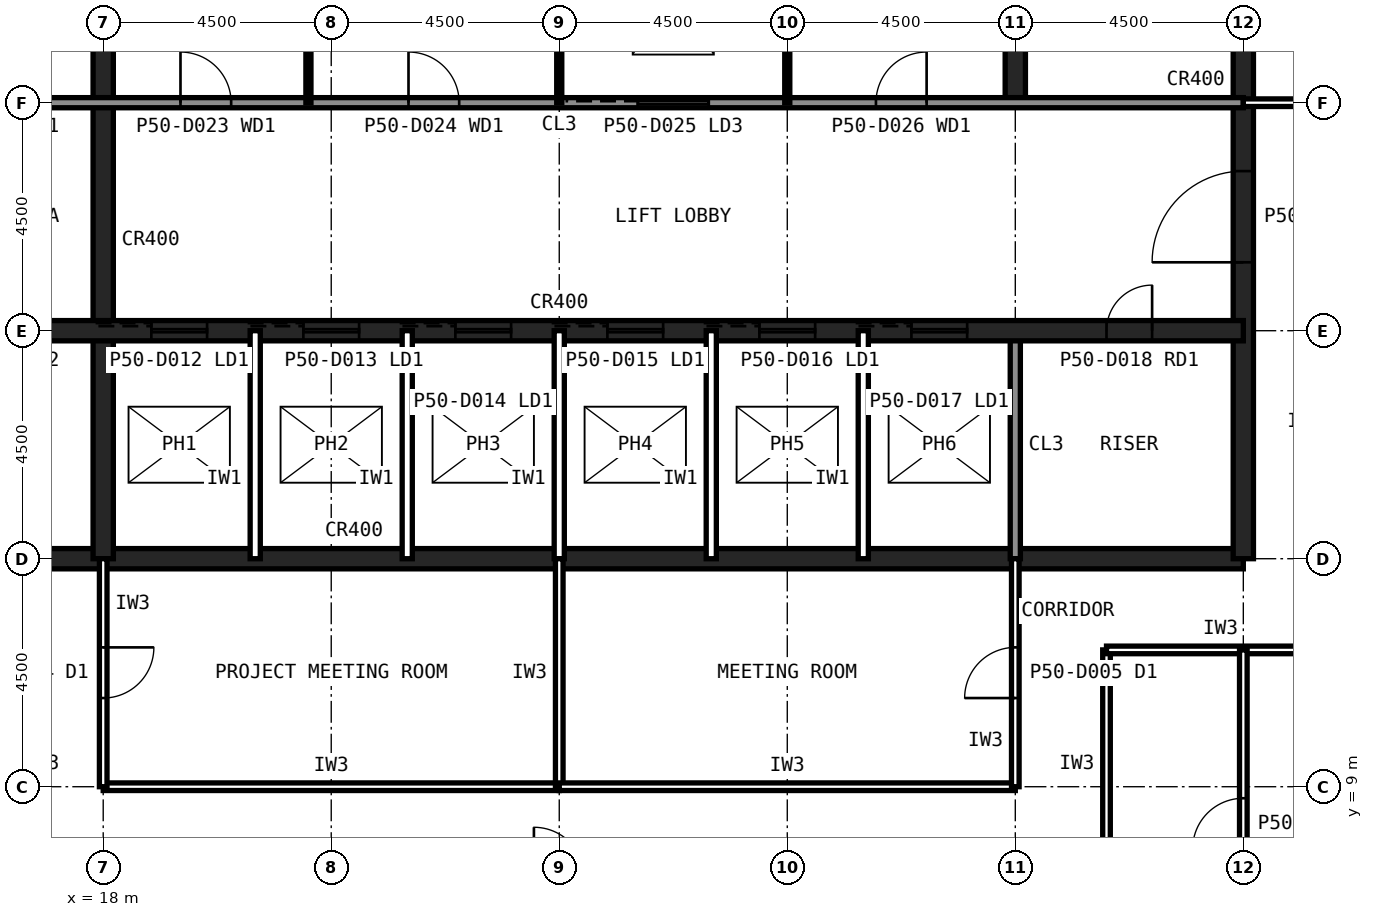
"""IFC4 building model, lengths in metres.
Left out: names, types, materials, properties, quantities, classifications, styles, units other than length and angle.
Written with IfcOpenShell. Run it as: python <this file> out.ifc"""

import sys

from ifc_helpers import new_model, si_unit, direction, frame, frame_2d, origin, place, context, subcontext, project, spatial, rectangle, extrude, element, fill, save


model = new_model("IFC4")
c1 = context("Model", 3, precision=1e-05, world=origin(), true_north=direction((0.0, 1.0)))
c2 = subcontext(c1, "Body", "Model", "MODEL_VIEW")
j1 = project(units=[si_unit("LENGTHUNIT", "METRE"), si_unit("PLANEANGLEUNIT", "RADIAN")], contexts=[c1])
p1 = place(None, origin())
s1 = spatial("IfcSite", under=j1, at=p1, CompositionType="ELEMENT")
p2 = place(p1, origin())
s2 = spatial("IfcBuilding", under=s1, at=p2, CompositionType="ELEMENT")
p3 = place(p2, frame((0.0, 0.0, 214.6)))
s3 = spatial("IfcBuildingStorey", under=s2, at=p3, CompositionType="ELEMENT", Elevation=214.6)
p4 = place(p3, frame((13.5, 13.5, 0.0), z_axis=(0.0, 0.0, 1.0), x_axis=(1.0, 0.0, 0.0)))
e1 = element("IfcWall", 1, at=p4, inside=s3, PredefinedType="SHEAR", context=c2, shape_type="SweptSolid", body=[
    extrude(rectangle(XDim=27.0, YDim=0.4, at=frame_2d((13.5, 0.0))), origin(), (0.0, 0.0, 1.0), 4.0),
])
p5 = place(p3, frame((40.5, 13.5, 0.0), z_axis=(0.0, 0.0, 1.0), x_axis=(0.0, 1.0, 0.0)))
e2 = element("IfcWall", 2, at=p5, inside=s3, PredefinedType="SHEAR", context=c2, shape_type="SweptSolid", body=[
    extrude(rectangle(XDim=27.0, YDim=0.4, at=frame_2d((13.5, 0.0))), origin(), (0.0, 0.0, 1.0), 4.0),
])
p6 = place(p5, frame((5.85, 0.0, 0.0)))
e3 = element("IfcOpeningElement", 3, at=p6, cuts=e2, PredefinedType="OPENING", context=c2, shape_type="SweptSolid", body=[
    extrude(rectangle(XDim=1.8, YDim=2.1, at=frame_2d((0.9, 1.05))), frame((0.0, 0.21, 0.0), z_axis=(0.0, -1.0, 0.0), x_axis=(1.0, 0.0, 0.0)), (0.0, 0.0, 1.0), 0.42),
])
p7 = place(p5, frame((19.65, 0.0, 0.0)))
e4 = element("IfcOpeningElement", 4, at=p7, cuts=e2, PredefinedType="OPENING", context=c2, shape_type="SweptSolid", body=[
    extrude(rectangle(XDim=1.2, YDim=2.1, at=frame_2d((0.6, 1.05))), frame((0.0, 0.21, 0.0), z_axis=(0.0, -1.0, 0.0), x_axis=(1.0, 0.0, 0.0)), (0.0, 0.0, 1.0), 0.42),
])
p8 = place(p3, frame((18.0, 13.5, 0.0), z_axis=(0.0, 0.0, 1.0), x_axis=(0.0, 1.0, 0.0)))
e5 = element("IfcWall", 5, at=p8, inside=s3, PredefinedType="SHEAR", context=c2, shape_type="SweptSolid", body=[
    extrude(rectangle(XDim=18.0, YDim=0.4, at=frame_2d((9.0, 0.0))), origin(), (0.0, 0.0, 1.0), 4.0),
])
p9 = place(p3, frame((36.0, 13.5, 0.0), z_axis=(0.0, 0.0, 1.0), x_axis=(0.0, 1.0, 0.0)))
e6 = element("IfcWall", 6, at=p9, inside=s3, PredefinedType="SOLIDWALL", context=c2, shape_type="SweptSolid", body=[
    extrude(rectangle(XDim=4.5, YDim=0.2, at=frame_2d((2.25, 0.0))), origin(), (0.0, 0.0, 1.0), 3.84),
])
p10 = place(p3, frame((36.0, 22.5, 0.0), z_axis=(0.0, 0.0, 1.0), x_axis=(0.0, 1.0, 0.0)))
e7 = element("IfcWall", 7, at=p10, inside=s3, PredefinedType="SHEAR", context=c2, shape_type="SweptSolid", body=[
    extrude(rectangle(XDim=18.0, YDim=0.4, at=frame_2d((9.0, 0.0))), origin(), (0.0, 0.0, 1.0), 4.0),
])
p11 = place(p3, frame((13.5, 18.0, 0.0), z_axis=(0.0, 0.0, 1.0), x_axis=(1.0, 0.0, 0.0)))
e8 = element("IfcWall", 8, at=p11, inside=s3, PredefinedType="SHEAR", context=c2, shape_type="SweptSolid", body=[
    extrude(rectangle(XDim=27.0, YDim=0.4, at=frame_2d((13.5, 0.0))), origin(), (0.0, 0.0, 1.0), 4.0),
])
p12 = place(p11, frame((24.3, 0.0, 0.0)))
e9 = element("IfcOpeningElement", 9, at=p12, cuts=e8, PredefinedType="OPENING", context=c2, shape_type="SweptSolid", body=[
    extrude(rectangle(XDim=0.9, YDim=2.1, at=frame_2d((0.45, 1.05))), frame((0.0, 0.21, 0.0), z_axis=(0.0, -1.0, 0.0), x_axis=(1.0, 0.0, 0.0)), (0.0, 0.0, 1.0), 0.42),
])
p13 = place(p11, frame((5.45, 0.0, 0.0)))
e10 = element("IfcOpeningElement", 10, at=p13, cuts=e8, PredefinedType="OPENING", context=c2, shape_type="SweptSolid", body=[
    extrude(rectangle(XDim=1.1, YDim=2.1, at=frame_2d((0.55, 1.05))), frame((0.0, 0.21, 0.0), z_axis=(0.0, -1.0, 0.0), x_axis=(1.0, 0.0, 0.0)), (0.0, 0.0, 1.0), 0.42),
])
p14 = place(p11, frame((8.45, 0.0, 0.0)))
e11 = element("IfcOpeningElement", 11, at=p14, cuts=e8, PredefinedType="OPENING", context=c2, shape_type="SweptSolid", body=[
    extrude(rectangle(XDim=1.1, YDim=2.1, at=frame_2d((0.55, 1.05))), frame((0.0, 0.21, 0.0), z_axis=(0.0, -1.0, 0.0), x_axis=(1.0, 0.0, 0.0)), (0.0, 0.0, 1.0), 0.42),
])
p15 = place(p11, frame((11.45, 0.0, 0.0)))
e12 = element("IfcOpeningElement", 12, at=p15, cuts=e8, PredefinedType="OPENING", context=c2, shape_type="SweptSolid", body=[
    extrude(rectangle(XDim=1.1, YDim=2.1, at=frame_2d((0.55, 1.05))), frame((0.0, 0.21, 0.0), z_axis=(0.0, -1.0, 0.0), x_axis=(1.0, 0.0, 0.0)), (0.0, 0.0, 1.0), 0.42),
])
p16 = place(p11, frame((14.45, 0.0, 0.0)))
e13 = element("IfcOpeningElement", 13, at=p16, cuts=e8, PredefinedType="OPENING", context=c2, shape_type="SweptSolid", body=[
    extrude(rectangle(XDim=1.1, YDim=2.1, at=frame_2d((0.55, 1.05))), frame((0.0, 0.21, 0.0), z_axis=(0.0, -1.0, 0.0), x_axis=(1.0, 0.0, 0.0)), (0.0, 0.0, 1.0), 0.42),
])
p17 = place(p11, frame((17.45, 0.0, 0.0)))
e14 = element("IfcOpeningElement", 14, at=p17, cuts=e8, PredefinedType="OPENING", context=c2, shape_type="SweptSolid", body=[
    extrude(rectangle(XDim=1.1, YDim=2.1, at=frame_2d((0.55, 1.05))), frame((0.0, 0.21, 0.0), z_axis=(0.0, -1.0, 0.0), x_axis=(1.0, 0.0, 0.0)), (0.0, 0.0, 1.0), 0.42),
])
p18 = place(p11, frame((20.45, 0.0, 0.0)))
e15 = element("IfcOpeningElement", 15, at=p18, cuts=e8, PredefinedType="OPENING", context=c2, shape_type="SweptSolid", body=[
    extrude(rectangle(XDim=1.1, YDim=2.1, at=frame_2d((0.55, 1.05))), frame((0.0, 0.21, 0.0), z_axis=(0.0, -1.0, 0.0), x_axis=(1.0, 0.0, 0.0)), (0.0, 0.0, 1.0), 0.42),
])
p19 = place(p11, frame((1.6, 0.0, 0.0)))
e16 = element("IfcOpeningElement", 16, at=p19, cuts=e8, PredefinedType="OPENING", context=c2, shape_type="SweptSolid", body=[
    extrude(rectangle(XDim=1.3, YDim=2.2, at=frame_2d((0.65, 1.1))), frame((0.0, 0.21, 0.0), z_axis=(0.0, -1.0, 0.0), x_axis=(1.0, 0.0, 0.0)), (0.0, 0.0, 1.0), 0.42),
])
p20 = place(p3, frame((13.5, 22.5, 0.0), z_axis=(0.0, 0.0, 1.0), x_axis=(1.0, 0.0, 0.0)))
e17 = element("IfcWall", 17, at=p20, inside=s3, PredefinedType="SOLIDWALL", context=c2, shape_type="SweptSolid", body=[
    extrude(rectangle(XDim=27.0, YDim=0.2, at=frame_2d((13.5, 0.0))), origin(), (0.0, 0.0, 1.0), 3.84),
])
p21 = place(p20, frame((1.65, 0.0, 0.0)))
e18 = element("IfcOpeningElement", 18, at=p21, cuts=e17, PredefinedType="OPENING", context=c2, shape_type="SweptSolid", body=[
    extrude(rectangle(XDim=1.2, YDim=2.1, at=frame_2d((0.6, 1.05))), frame((0.0, 0.11, 0.0), z_axis=(0.0, -1.0, 0.0), x_axis=(1.0, 0.0, 0.0)), (0.0, 0.0, 1.0), 0.22),
])
p22 = place(p20, frame((6.025, 0.0, 0.0)))
e19 = element("IfcOpeningElement", 19, at=p22, cuts=e17, PredefinedType="OPENING", context=c2, shape_type="SweptSolid", body=[
    extrude(rectangle(XDim=1.0, YDim=2.1, at=frame_2d((0.5, 1.05))), frame((0.0, 0.11, 0.0), z_axis=(0.0, -1.0, 0.0), x_axis=(1.0, 0.0, 0.0)), (0.0, 0.0, 1.0), 0.22),
])
p23 = place(p20, frame((10.525, 0.0, 0.0)))
e20 = element("IfcOpeningElement", 20, at=p23, cuts=e17, PredefinedType="OPENING", context=c2, shape_type="SweptSolid", body=[
    extrude(rectangle(XDim=1.0, YDim=2.1, at=frame_2d((0.5, 1.05))), frame((0.0, 0.11, 0.0), z_axis=(0.0, -1.0, 0.0), x_axis=(1.0, 0.0, 0.0)), (0.0, 0.0, 1.0), 0.22),
])
p24 = place(p20, frame((19.75, 0.0, 0.0)))
e21 = element("IfcOpeningElement", 21, at=p24, cuts=e17, PredefinedType="OPENING", context=c2, shape_type="SweptSolid", body=[
    extrude(rectangle(XDim=1.0, YDim=2.1, at=frame_2d((0.5, 1.05))), frame((0.0, 0.11, 0.0), z_axis=(0.0, -1.0, 0.0), x_axis=(1.0, 0.0, 0.0)), (0.0, 0.0, 1.0), 0.22),
])
p25 = place(p20, frame((15.05, 0.0, 0.0)))
e22 = element("IfcOpeningElement", 22, at=p25, cuts=e17, PredefinedType="OPENING", context=c2, shape_type="SweptSolid", body=[
    extrude(rectangle(XDim=1.4, YDim=2.4, at=frame_2d((0.7, 1.2))), frame((0.0, 0.11, 0.0), z_axis=(0.0, -1.0, 0.0), x_axis=(1.0, 0.0, 0.0)), (0.0, 0.0, 1.0), 0.22),
])
for number, where, z_axis, x_axis in (
    (23, (21.0, 13.5, 0.0), (0.0, 0.0, 1.0), (0.0, 1.0, 0.0)),
    (24, (24.0, 13.5, 0.0), (0.0, 0.0, 1.0), (0.0, 1.0, 0.0)),
    (25, (27.0, 13.5, 0.0), (0.0, 0.0, 1.0), (0.0, 1.0, 0.0)),
    (26, (30.0, 13.5, 0.0), (0.0, 0.0, 1.0), (0.0, 1.0, 0.0)),
    (27, (33.0, 13.5, 0.0), (0.0, 0.0, 1.0), (0.0, 1.0, 0.0)),
):
    element("IfcWall", number, at=place(p3, frame(where, z_axis=z_axis, x_axis=x_axis)), inside=s3, PredefinedType="PARTITIONING", context=c2, shape_type="SweptSolid", body=[
        extrude(rectangle(XDim=4.5, YDim=0.2, at=frame_2d((2.25, 0.0))), origin(), (0.0, 0.0, 1.0), 3.84),
    ])
for number, where, z_axis, x_axis in (
    (28, (22.05, 22.5, 0.0), (0.0, 0.0, 1.0), (0.0, 1.0, 0.0)),
    (29, (27.0, 22.5, 0.0), (0.0, 0.0, 1.0), (0.0, 1.0, 0.0)),
    (30, (31.5, 22.5, 0.0), (0.0, 0.0, 1.0), (0.0, 1.0, 0.0)),
):
    element("IfcWall", number, at=place(p3, frame(where, z_axis=z_axis, x_axis=x_axis)), inside=s3, PredefinedType="PLUMBINGWALL", context=c2, shape_type="SweptSolid", body=[
        extrude(rectangle(XDim=9.0, YDim=0.1, at=frame_2d((4.5, 0.0))), origin(), (0.0, 0.0, 1.0), 3.84),
    ])
for number, where, z_axis, x_axis in (
    (31, (37.8, 7.2, 0.0), (0.0, 0.0, 1.0), (0.0, 1.0, 0.0)),
    (32, (37.8, 11.7, 0.0), (0.0, 0.0, 1.0), (1.0, 0.0, 0.0)),
):
    element("IfcWall", number, at=place(p3, frame(where, z_axis=z_axis, x_axis=x_axis)), inside=s3, PredefinedType="PARTITIONING", context=c2, shape_type="SweptSolid", body=[
        extrude(rectangle(XDim=4.5, YDim=0.15, at=frame_2d((2.25, 0.0))), origin(), (0.0, 0.0, 1.0), 3.84),
    ])
p26 = place(p3, frame((18.0, 9.0, 0.0), z_axis=(0.0, 0.0, 1.0), x_axis=(1.0, 0.0, 0.0)))
e33 = element("IfcWall", 33, at=p26, inside=s3, PredefinedType="PARTITIONING", context=c2, shape_type="SweptSolid", body=[
    extrude(rectangle(XDim=9.0, YDim=0.15, at=frame_2d((4.5, 0.0))), origin(), (0.0, 0.0, 1.0), 3.84),
])
p27 = place(p3, frame((27.0, 9.0, 0.0), z_axis=(0.0, 0.0, 1.0), x_axis=(0.0, 1.0, 0.0)))
e34 = element("IfcWall", 34, at=p27, inside=s3, PredefinedType="PARTITIONING", context=c2, shape_type="SweptSolid", body=[
    extrude(rectangle(XDim=4.5, YDim=0.15, at=frame_2d((2.25, 0.0))), origin(), (0.0, 0.0, 1.0), 2.989),
])
p28 = place(p3, frame((18.0, 13.5, 0.0), z_axis=(0.0, 0.0, 1.0), x_axis=(0.0, -1.0, 0.0)))
e35 = element("IfcWall", 35, at=p28, inside=s3, PredefinedType="PARTITIONING", context=c2, shape_type="SweptSolid", body=[
    extrude(rectangle(XDim=4.5, YDim=0.15, at=frame_2d((2.25, 0.0))), origin(), (0.0, 0.0, 1.0), 2.989),
])
p29 = place(p28, frame((1.75, 0.0, 0.0)))
e36 = element("IfcOpeningElement", 36, at=p29, cuts=e35, PredefinedType="OPENING", context=c2, shape_type="SweptSolid", body=[
    extrude(rectangle(XDim=1.0, YDim=2.1, at=frame_2d((0.5, 1.05))), frame((0.0, 0.085, 0.0), z_axis=(0.0, -1.0, 0.0), x_axis=(1.0, 0.0, 0.0)), (0.0, 0.0, 1.0), 0.17),
])
p30 = place(p3, frame((40.5, 22.5, 0.0), z_axis=(0.0, 0.0, 1.0), x_axis=(1.0, 0.0, 0.0)))
e37 = element("IfcWall", 37, at=p30, inside=s3, PredefinedType="PARTITIONING", context=c2, shape_type="SweptSolid", body=[
    extrude(rectangle(XDim=4.5, YDim=0.15, at=frame_2d((2.25, 0.0))), origin(), (0.0, 0.0, 1.0), 2.989),
])
p31 = place(p3, frame((27.0, 9.0, 0.0), z_axis=(0.0, 0.0, 1.0), x_axis=(1.0, 0.0, 0.0)))
e38 = element("IfcWall", 38, at=p31, inside=s3, PredefinedType="PARTITIONING", context=c2, shape_type="SweptSolid", body=[
    extrude(rectangle(XDim=9.0, YDim=0.15, at=frame_2d((4.5, 0.0))), origin(), (0.0, 0.0, 1.0), 3.84),
])
p32 = place(p3, frame((36.0, 9.0, 0.0), z_axis=(0.0, 0.0, 1.0), x_axis=(0.0, 1.0, 0.0)))
e39 = element("IfcWall", 39, at=p32, inside=s3, PredefinedType="PARTITIONING", context=c2, shape_type="SweptSolid", body=[
    extrude(rectangle(XDim=4.5, YDim=0.15, at=frame_2d((2.25, 0.0))), origin(), (0.0, 0.0, 1.0), 2.989),
])
p33 = place(p32, frame((1.75, 0.0, 0.0)))
e40 = element("IfcOpeningElement", 40, at=p33, cuts=e39, PredefinedType="OPENING", context=c2, shape_type="SweptSolid", body=[
    extrude(rectangle(XDim=1.0, YDim=2.1, at=frame_2d((0.5, 1.05))), frame((0.0, 0.085, 0.0), z_axis=(0.0, -1.0, 0.0), x_axis=(1.0, 0.0, 0.0)), (0.0, 0.0, 1.0), 0.17),
])
p34 = place(p3, frame((40.5, 4.845, 0.0), z_axis=(0.0, 0.0, 1.0), x_axis=(0.0, 1.0, 0.0)))
e41 = element("IfcWall", 41, at=p34, inside=s3, PredefinedType="PARTITIONING", context=c2, shape_type="SweptSolid", body=[
    extrude(rectangle(XDim=6.855, YDim=0.15, at=frame_2d((3.427, 0.0))), origin(), (0.0, 0.0, 1.0), 2.989),
])
p35 = place(p34, frame((2.927, 0.0, 0.0)))
e42 = element("IfcOpeningElement", 42, at=p35, cuts=e41, PredefinedType="OPENING", context=c2, shape_type="SweptSolid", body=[
    extrude(rectangle(XDim=1.0, YDim=2.1, at=frame_2d((0.5, 1.05))), frame((0.0, 0.085, 0.0), z_axis=(0.0, -1.0, 0.0), x_axis=(1.0, 0.0, 0.0)), (0.0, 0.0, 1.0), 0.17),
])
p36 = place(p6, origin())
e43 = element("IfcDoor", 43, at=p36, inside=s3, OperationType="SINGLE_SWING_LEFT", PredefinedType="DOOR", context=c2, shape_type="SweptSolid", body=[
    extrude(rectangle(XDim=1.8, YDim=2.1, at=frame_2d((0.9, 1.05))), frame((0.0, 0.025, 0.0), z_axis=(0.0, -1.0, 0.0), x_axis=(1.0, 0.0, 0.0)), (0.0, 0.0, 1.0), 0.05),
])
fill(e3, e43)
p37 = place(p22, origin())
e44 = element("IfcDoor", 44, at=p37, inside=s3, OperationType="SINGLE_SWING_LEFT", PredefinedType="DOOR", context=c2, shape_type="SweptSolid", body=[
    extrude(rectangle(XDim=1.0, YDim=2.1, at=frame_2d((0.5, 1.05))), frame((0.0, 0.025, 0.0), z_axis=(0.0, -1.0, 0.0), x_axis=(1.0, 0.0, 0.0)), (0.0, 0.0, 1.0), 0.05),
])
fill(e19, e44)
p38 = place(p23, origin())
e45 = element("IfcDoor", 45, at=p38, inside=s3, OperationType="SINGLE_SWING_LEFT", PredefinedType="DOOR", context=c2, shape_type="SweptSolid", body=[
    extrude(rectangle(XDim=1.0, YDim=2.1, at=frame_2d((0.5, 1.05))), frame((0.0, 0.025, 0.0), z_axis=(0.0, -1.0, 0.0), x_axis=(1.0, 0.0, 0.0)), (0.0, 0.0, 1.0), 0.05),
])
fill(e20, e45)
p39 = place(p24, origin())
e46 = element("IfcDoor", 46, at=p39, inside=s3, OperationType="SINGLE_SWING_RIGHT", PredefinedType="DOOR", context=c2, shape_type="SweptSolid", body=[
    extrude(rectangle(XDim=1.0, YDim=2.1, at=frame_2d((0.5, 1.05))), frame((0.0, 0.025, 0.0), z_axis=(0.0, -1.0, 0.0), x_axis=(1.0, 0.0, 0.0)), (0.0, 0.0, 1.0), 0.05),
])
fill(e21, e46)
p40 = place(p12, origin())
e47 = element("IfcDoor", 47, at=p40, inside=s3, OperationType="SINGLE_SWING_RIGHT", PredefinedType="DOOR", context=c2, shape_type="SweptSolid", body=[
    extrude(rectangle(XDim=0.9, YDim=2.1, at=frame_2d((0.45, 1.05))), frame((0.0, 0.025, 0.0), z_axis=(0.0, -1.0, 0.0), x_axis=(1.0, 0.0, 0.0)), (0.0, 0.0, 1.0), 0.05),
])
fill(e9, e47)
p41 = place(p13, origin())
e48 = element("IfcDoor", 48, at=p41, inside=s3, OperationType="SLIDING_TO_LEFT", PredefinedType="DOOR", context=c2, shape_type="SweptSolid", body=[
    extrude(rectangle(XDim=1.1, YDim=2.1, at=frame_2d((0.55, 1.05))), frame((0.0, 0.025, 0.0), z_axis=(0.0, -1.0, 0.0), x_axis=(1.0, 0.0, 0.0)), (0.0, 0.0, 1.0), 0.05),
])
fill(e10, e48)
p42 = place(p14, origin())
e49 = element("IfcDoor", 49, at=p42, inside=s3, OperationType="SLIDING_TO_LEFT", PredefinedType="DOOR", context=c2, shape_type="SweptSolid", body=[
    extrude(rectangle(XDim=1.1, YDim=2.1, at=frame_2d((0.55, 1.05))), frame((0.0, 0.025, 0.0), z_axis=(0.0, -1.0, 0.0), x_axis=(1.0, 0.0, 0.0)), (0.0, 0.0, 1.0), 0.05),
])
fill(e11, e49)
p43 = place(p15, origin())
e50 = element("IfcDoor", 50, at=p43, inside=s3, OperationType="SLIDING_TO_LEFT", PredefinedType="DOOR", context=c2, shape_type="SweptSolid", body=[
    extrude(rectangle(XDim=1.1, YDim=2.1, at=frame_2d((0.55, 1.05))), frame((0.0, 0.025, 0.0), z_axis=(0.0, -1.0, 0.0), x_axis=(1.0, 0.0, 0.0)), (0.0, 0.0, 1.0), 0.05),
])
fill(e12, e50)
p44 = place(p16, origin())
e51 = element("IfcDoor", 51, at=p44, inside=s3, OperationType="SLIDING_TO_LEFT", PredefinedType="DOOR", context=c2, shape_type="SweptSolid", body=[
    extrude(rectangle(XDim=1.1, YDim=2.1, at=frame_2d((0.55, 1.05))), frame((0.0, 0.025, 0.0), z_axis=(0.0, -1.0, 0.0), x_axis=(1.0, 0.0, 0.0)), (0.0, 0.0, 1.0), 0.05),
])
fill(e13, e51)
p45 = place(p17, origin())
e52 = element("IfcDoor", 52, at=p45, inside=s3, OperationType="SLIDING_TO_LEFT", PredefinedType="DOOR", context=c2, shape_type="SweptSolid", body=[
    extrude(rectangle(XDim=1.1, YDim=2.1, at=frame_2d((0.55, 1.05))), frame((0.0, 0.025, 0.0), z_axis=(0.0, -1.0, 0.0), x_axis=(1.0, 0.0, 0.0)), (0.0, 0.0, 1.0), 0.05),
])
fill(e14, e52)
p46 = place(p18, origin())
e53 = element("IfcDoor", 53, at=p46, inside=s3, OperationType="SLIDING_TO_LEFT", PredefinedType="DOOR", context=c2, shape_type="SweptSolid", body=[
    extrude(rectangle(XDim=1.1, YDim=2.1, at=frame_2d((0.55, 1.05))), frame((0.0, 0.025, 0.0), z_axis=(0.0, -1.0, 0.0), x_axis=(1.0, 0.0, 0.0)), (0.0, 0.0, 1.0), 0.05),
])
fill(e15, e53)
p47 = place(p25, origin())
e54 = element("IfcDoor", 54, at=p47, inside=s3, OperationType="SLIDING_TO_LEFT", PredefinedType="DOOR", context=c2, shape_type="SweptSolid", body=[
    extrude(rectangle(XDim=1.4, YDim=2.4, at=frame_2d((0.7, 1.2))), frame((0.0, 0.025, 0.0), z_axis=(0.0, -1.0, 0.0), x_axis=(1.0, 0.0, 0.0)), (0.0, 0.0, 1.0), 0.05),
])
fill(e22, e54)
p48 = place(p29, origin())
e55 = element("IfcDoor", 55, at=p48, inside=s3, OperationType="SINGLE_SWING_LEFT", PredefinedType="DOOR", context=c2, shape_type="SweptSolid", body=[
    extrude(rectangle(XDim=1.0, YDim=2.1, at=frame_2d((0.5, 1.05))), frame((0.0, 0.025, 0.0), z_axis=(0.0, -1.0, 0.0), x_axis=(1.0, 0.0, 0.0)), (0.0, 0.0, 1.0), 0.05),
])
fill(e36, e55)
p49 = place(p33, origin())
e56 = element("IfcDoor", 56, at=p49, inside=s3, OperationType="SINGLE_SWING_LEFT", PredefinedType="DOOR", context=c2, shape_type="SweptSolid", body=[
    extrude(rectangle(XDim=1.0, YDim=2.1, at=frame_2d((0.5, 1.05))), frame((0.0, 0.025, 0.0), z_axis=(0.0, -1.0, 0.0), x_axis=(1.0, 0.0, 0.0)), (0.0, 0.0, 1.0), 0.05),
])
fill(e40, e56)
p50 = place(p35, origin())
e57 = element("IfcDoor", 57, at=p50, inside=s3, OperationType="SINGLE_SWING_LEFT", PredefinedType="DOOR", context=c2, shape_type="SweptSolid", body=[
    extrude(rectangle(XDim=1.0, YDim=2.1, at=frame_2d((0.5, 1.05))), frame((0.0, 0.025, 0.0), z_axis=(0.0, -1.0, 0.0), x_axis=(1.0, 0.0, 0.0)), (0.0, 0.0, 1.0), 0.05),
])
fill(e42, e57)
save(model, sys.argv[1])
